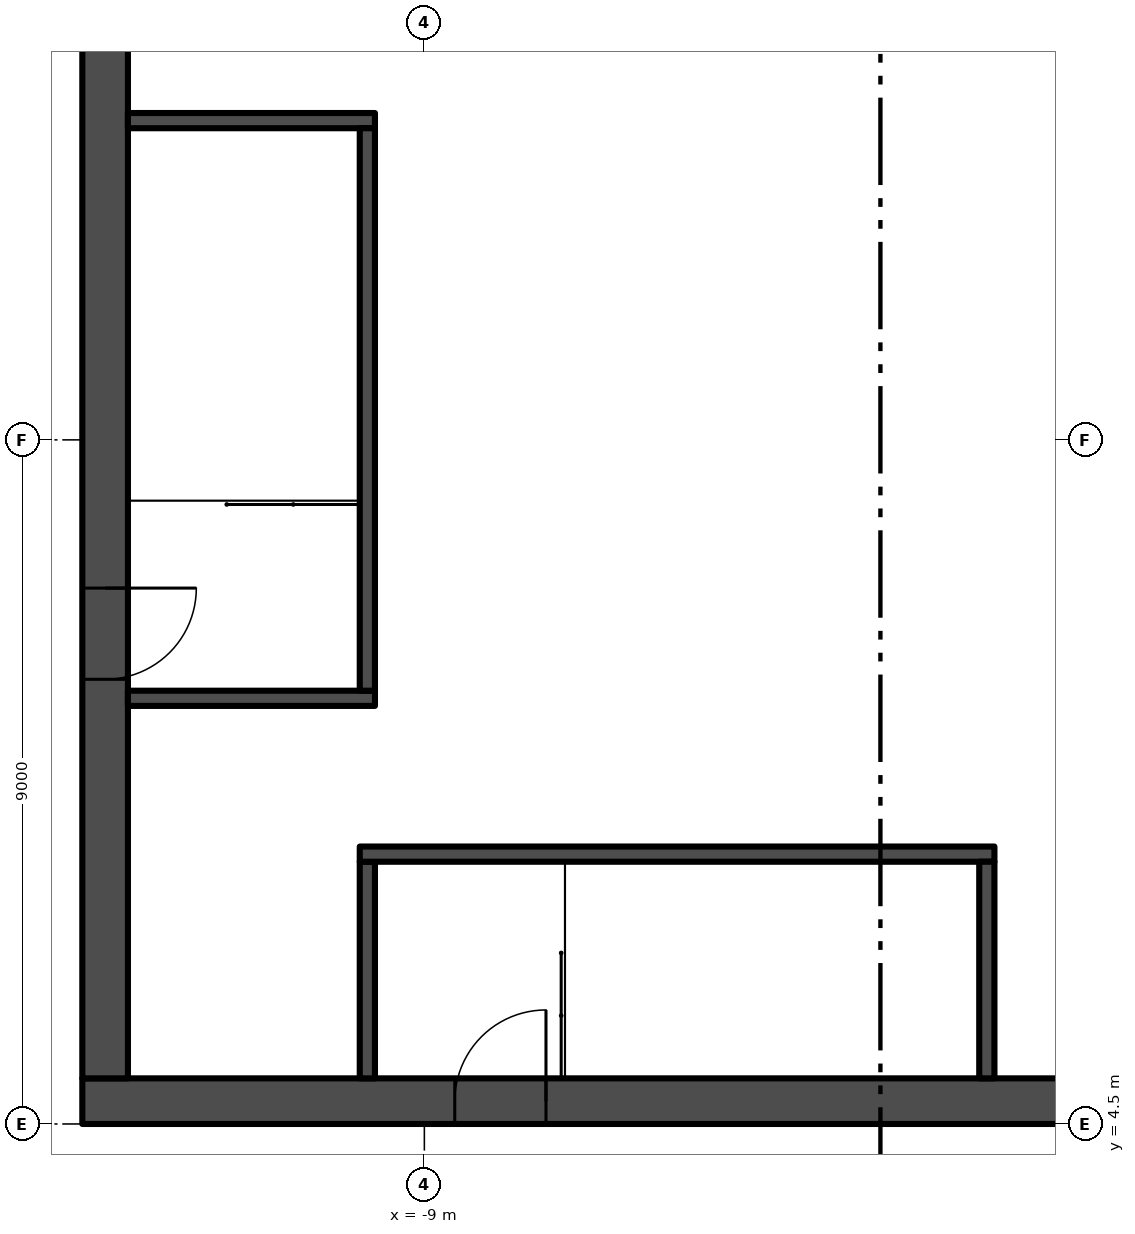
"""IFC4 building model, lengths in metres.
Left out: names, types, materials, properties, quantities, classifications, styles, units other than length and angle.
Written with IfcOpenShell. Run it as: python <this file> out.ifc"""

import sys

from ifc_helpers import new_model, si_unit, direction, frame, frame_2d, origin, place, context, subcontext, project, spatial, rectangle, extrude, element, fill, save


model = new_model("IFC4")
c1 = context("Model", 3, precision=1e-05, world=origin(), true_north=direction((0.0, 1.0)))
c2 = subcontext(c1, "Body", "Model", "MODEL_VIEW")
j1 = project(units=[si_unit("LENGTHUNIT", "METRE"), si_unit("PLANEANGLEUNIT", "RADIAN")], contexts=[c1])
p1 = place(None, origin())
s1 = spatial("IfcSite", under=j1, at=p1, CompositionType="ELEMENT")
p2 = place(p1, origin())
s2 = spatial("IfcBuilding", under=s1, at=p2, CompositionType="ELEMENT")
p3 = place(p2, frame((0.0, 0.0, 303.4)))
s3 = spatial("IfcBuildingStorey", under=s2, at=p3, CompositionType="ELEMENT", Elevation=303.4)
p4 = place(p3, frame((-13.5, 4.8, -0.35), z_axis=(0.0, 0.0, 1.0), x_axis=(1.0, 0.0, 0.0)))
e1 = element("IfcWall", 1, at=p4, inside=s3, PredefinedType="SHEAR", context=c2, shape_type="SweptSolid", body=[
    extrude(rectangle(XDim=27.0, YDim=0.6, at=frame_2d((13.5, 0.0))), origin(), (0.0, 0.0, 1.0), 9.35),
])
p5 = place(p4, frame((4.9, 0.0, 0.35)))
e2 = element("IfcOpeningElement", 2, at=p5, cuts=e1, PredefinedType="OPENING", context=c2, shape_type="SweptSolid", body=[
    extrude(rectangle(XDim=1.2, YDim=2.2, at=frame_2d((0.6, 1.1))), frame((0.0, 0.31, 0.0), z_axis=(0.0, -1.0, 0.0), x_axis=(1.0, 0.0, 0.0)), (0.0, 0.0, 1.0), 0.62),
])
p6 = place(p4, frame((20.75, 0.0, 0.35)))
e3 = element("IfcOpeningElement", 3, at=p6, cuts=e1, PredefinedType="OPENING", context=c2, shape_type="SweptSolid", body=[
    extrude(rectangle(XDim=1.5, YDim=2.2, at=frame_2d((0.75, 1.1))), frame((0.0, 0.31, 0.0), z_axis=(0.0, -1.0, 0.0), x_axis=(1.0, 0.0, 0.0)), (0.0, 0.0, 1.0), 0.62),
])
p7 = place(p3, frame((-13.2, 21.9, -0.35), z_axis=(0.0, 0.0, 1.0), x_axis=(0.0, -1.0, 0.0)))
e4 = element("IfcWall", 4, at=p7, inside=s3, PredefinedType="SHEAR", context=c2, shape_type="SweptSolid", body=[
    extrude(rectangle(XDim=16.8, YDim=0.6, at=frame_2d((8.4, 0.0))), origin(), (0.0, 0.0, 1.0), 9.35),
])
p8 = place(p7, frame((10.35, 0.0, 0.35)))
e5 = element("IfcOpeningElement", 5, at=p8, cuts=e4, PredefinedType="OPENING", context=c2, shape_type="SweptSolid", body=[
    extrude(rectangle(XDim=1.2, YDim=2.2, at=frame_2d((0.6, 1.1))), frame((0.0, 0.31, 0.0), z_axis=(0.0, -1.0, 0.0), x_axis=(1.0, 0.0, 0.0)), (0.0, 0.0, 1.0), 0.62),
])
for number, where, z_axis, x_axis in (
    (6, (-12.9, 10.1, 0.0), (0.0, 0.0, 1.0), (1.0, 0.0, 0.0)),
    (7, (-12.9, 17.7, 0.0), (0.0, 0.0, 1.0), (1.0, 0.0, 0.0)),
):
    element("IfcWall", number, at=place(p3, frame(where, z_axis=z_axis, x_axis=x_axis)), inside=s3, PredefinedType="SHEAR", context=c2, shape_type="SweptSolid", body=[
        extrude(rectangle(XDim=3.25, YDim=0.2, at=frame_2d((1.625, 0.0))), origin(), (0.0, 0.0, 1.0), 3.2),
    ])
p9 = place(p3, frame((-9.75, 5.1, 0.0), z_axis=(0.0, 0.0, 1.0), x_axis=(0.0, 1.0, 0.0)))
e8 = element("IfcWall", 8, at=p9, inside=s3, PredefinedType="SHEAR", context=c2, shape_type="SweptSolid", body=[
    extrude(rectangle(XDim=2.85, YDim=0.2, at=frame_2d((1.425, 0.0))), origin(), (0.0, 0.0, 1.0), 3.2),
])
p10 = place(p3, frame((-9.85, 8.05, 0.0), z_axis=(0.0, 0.0, 1.0), x_axis=(1.0, 0.0, 0.0)))
e9 = element("IfcWall", 9, at=p10, inside=s3, PredefinedType="SHEAR", context=c2, shape_type="SweptSolid", body=[
    extrude(rectangle(XDim=8.35, YDim=0.2, at=frame_2d((4.175, 0.0))), origin(), (0.0, 0.0, 1.0), 3.2),
])
p11 = place(p3, frame((-9.75, 10.2, 0.0), z_axis=(0.0, 0.0, 1.0), x_axis=(0.0, 1.0, 0.0)))
e10 = element("IfcWall", 10, at=p11, inside=s3, PredefinedType="SHEAR", context=c2, shape_type="SweptSolid", body=[
    extrude(rectangle(XDim=7.4, YDim=0.2, at=frame_2d((3.7, 0.0))), origin(), (0.0, 0.0, 1.0), 3.2),
])
p12 = place(p3, frame((-1.6, 5.1, 0.0), z_axis=(0.0, 0.0, 1.0), x_axis=(0.0, 1.0, 0.0)))
e11 = element("IfcWall", 11, at=p12, inside=s3, PredefinedType="SHEAR", context=c2, shape_type="SweptSolid", body=[
    extrude(rectangle(XDim=2.85, YDim=0.2, at=frame_2d((1.425, 0.0))), origin(), (0.0, 0.0, 1.0), 3.2),
])
p13 = place(p8, frame((1.2, 0.0, 0.0), z_axis=(0.0, 0.0, 1.0), x_axis=(-1.0, 0.0, 0.0)))
e12 = element("IfcDoor", 12, at=p13, inside=s3, OperationType="SINGLE_SWING_RIGHT", PredefinedType="DOOR", context=c2, shape_type="SweptSolid", body=[
    extrude(rectangle(XDim=1.2, YDim=2.2, at=frame_2d((0.6, 1.1))), frame((0.0, 0.025, 0.0), z_axis=(0.0, -1.0, 0.0), x_axis=(1.0, 0.0, 0.0)), (0.0, 0.0, 1.0), 0.05),
])
fill(e5, e12)
p14 = place(p5, frame((1.2, 0.0, 0.0), z_axis=(0.0, 0.0, 1.0), x_axis=(-1.0, 0.0, 0.0)))
e13 = element("IfcDoor", 13, at=p14, inside=s3, OperationType="SINGLE_SWING_LEFT", PredefinedType="DOOR", context=c2, shape_type="SweptSolid", body=[
    extrude(rectangle(XDim=1.2, YDim=2.2, at=frame_2d((0.6, 1.1))), frame((0.0, 0.025, 0.0), z_axis=(0.0, -1.0, 0.0), x_axis=(1.0, 0.0, 0.0)), (0.0, 0.0, 1.0), 0.05),
])
fill(e2, e13)
save(model, sys.argv[1])
